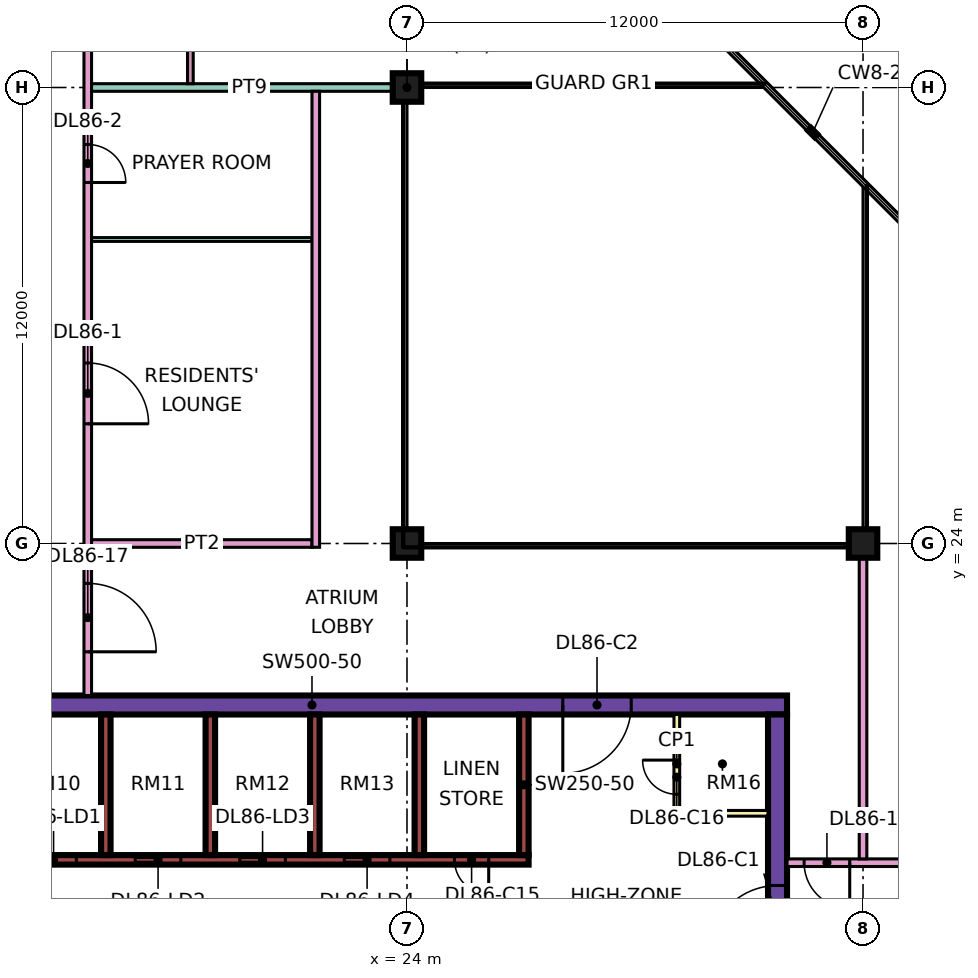
"""IFC4 building model, lengths in metres.
Left out: names, types, materials, properties, quantities, classifications, styles, units other than length and angle.
Written with IfcOpenShell. Run it as: python <this file> out.ifc"""

import sys

from ifc_helpers import new_model, si_unit, direction, frame, frame_2d, origin, origin_2d, place, context, subcontext, project, spatial, rectangle, extrude, element, fill, save


model = new_model("IFC4")
c1 = context("Model", 3, precision=1e-05, world=origin(), true_north=direction((0.0, 1.0)))
c2 = subcontext(c1, "Body", "Model", "MODEL_VIEW")
j1 = project(units=[si_unit("LENGTHUNIT", "METRE"), si_unit("PLANEANGLEUNIT", "RADIAN")], contexts=[c1])
p1 = place(None, origin())
s1 = spatial("IfcSite", under=j1, at=p1, CompositionType="ELEMENT")
p2 = place(p1, origin())
s2 = spatial("IfcBuilding", under=s1, at=p2, CompositionType="ELEMENT")
p3 = place(p2, frame((0.0, 0.0, 368.9)))
s3 = spatial("IfcBuildingStorey", under=s2, at=p3, CompositionType="ELEMENT", Elevation=368.9)
for number, where, z_axis, x_axis in (
    (1, (24.0, 24.0, 0.0), (0.0, 0.0, 1.0), (1.0, 0.0, 0.0)),
    (2, (24.0, 36.0, 0.0), (0.0, 0.0, 1.0), (1.0, 0.0, 0.0)),
    (3, (36.0, 24.0, 0.0), (0.0, 0.0, 1.0), (1.0, 0.0, 0.0)),
):
    element("IfcColumn", number, at=place(p3, frame(where, z_axis=z_axis, x_axis=x_axis)), inside=s3, PredefinedType="COLUMN", context=c2, shape_type="SweptSolid", body=[
        extrude(rectangle(XDim=0.75, YDim=0.75, at=origin_2d()), origin(), (0.0, 0.0, 1.0), 3.75),
    ])
p4 = place(p3, frame((9.0, 19.75, 0.0), z_axis=(0.0, 0.0, 1.0), x_axis=(1.0, 0.0, 0.0)))
e4 = element("IfcWall", 4, at=p4, inside=s3, PredefinedType="SHEAR", context=c2, shape_type="SweptSolid", body=[
    extrude(rectangle(XDim=25.0, YDim=0.5, at=frame_2d((12.5, 0.0))), origin(), (0.0, 0.0, 1.0), 3.75),
])
p5 = place(p4, frame((19.1, 0.0, 0.0)))
e5 = element("IfcOpeningElement", 5, at=p5, cuts=e4, PredefinedType="OPENING", context=c2, shape_type="SweptSolid", body=[
    extrude(rectangle(XDim=1.8, YDim=2.4, at=frame_2d((0.9, 1.2))), frame((0.0, 0.26, 0.0), z_axis=(0.0, -1.0, 0.0), x_axis=(1.0, 0.0, 0.0)), (0.0, 0.0, 1.0), 0.52),
])
p6 = place(p3, frame((33.75, 7.5, 0.0), z_axis=(0.0, 0.0, 1.0), x_axis=(0.0, 1.0, 0.0)))
e6 = element("IfcWall", 6, at=p6, inside=s3, PredefinedType="SHEAR", context=c2, shape_type="SweptSolid", body=[
    extrude(rectangle(XDim=12.0, YDim=0.5, at=frame_2d((6.0, 0.0))), origin(), (0.0, 0.0, 1.0), 3.75),
])
p7 = place(p6, frame((5.7, 0.0, 0.0)))
e7 = element("IfcOpeningElement", 7, at=p7, cuts=e6, PredefinedType="OPENING", context=c2, shape_type="SweptSolid", body=[
    extrude(rectangle(XDim=1.8, YDim=2.4, at=frame_2d((0.9, 1.2))), frame((0.0, 0.26, 0.0), z_axis=(0.0, -1.0, 0.0), x_axis=(1.0, 0.0, 0.0)), (0.0, 0.0, 1.0), 0.52),
])
p8 = place(p3, frame((13.45, 15.675, 0.0), z_axis=(0.0, 0.0, 1.0), x_axis=(1.0, 0.0, 0.0)))
e8 = element("IfcWall", 8, at=p8, inside=s3, PredefinedType="SHEAR", context=c2, shape_type="SweptSolid", body=[
    extrude(rectangle(XDim=13.75, YDim=0.25, at=frame_2d((6.875, 0.0))), origin(), (0.0, 0.0, 1.0), 3.75),
])
p9 = place(p8, frame((0.65, 0.0, 0.0)))
e9 = element("IfcOpeningElement", 9, at=p9, cuts=e8, PredefinedType="OPENING", context=c2, shape_type="SweptSolid", body=[
    extrude(rectangle(XDim=1.2, YDim=2.2, at=frame_2d((0.6, 1.1))), frame((0.0, 0.135, 0.0), z_axis=(0.0, -1.0, 0.0), x_axis=(1.0, 0.0, 0.0)), (0.0, 0.0, 1.0), 0.27),
])
p10 = place(p8, frame((3.4, 0.0, 0.0)))
e10 = element("IfcOpeningElement", 10, at=p10, cuts=e8, PredefinedType="OPENING", context=c2, shape_type="SweptSolid", body=[
    extrude(rectangle(XDim=1.2, YDim=2.2, at=frame_2d((0.6, 1.1))), frame((0.0, 0.135, 0.0), z_axis=(0.0, -1.0, 0.0), x_axis=(1.0, 0.0, 0.0)), (0.0, 0.0, 1.0), 0.27),
])
p11 = place(p8, frame((6.15, 0.0, 0.0)))
e11 = element("IfcOpeningElement", 11, at=p11, cuts=e8, PredefinedType="OPENING", context=c2, shape_type="SweptSolid", body=[
    extrude(rectangle(XDim=1.2, YDim=2.2, at=frame_2d((0.6, 1.1))), frame((0.0, 0.135, 0.0), z_axis=(0.0, -1.0, 0.0), x_axis=(1.0, 0.0, 0.0)), (0.0, 0.0, 1.0), 0.27),
])
p12 = place(p8, frame((8.9, 0.0, 0.0)))
e12 = element("IfcOpeningElement", 12, at=p12, cuts=e8, PredefinedType="OPENING", context=c2, shape_type="SweptSolid", body=[
    extrude(rectangle(XDim=1.2, YDim=2.2, at=frame_2d((0.6, 1.1))), frame((0.0, 0.135, 0.0), z_axis=(0.0, -1.0, 0.0), x_axis=(1.0, 0.0, 0.0)), (0.0, 0.0, 1.0), 0.27),
])
p13 = place(p8, frame((11.8, 0.0, 0.0)))
e13 = element("IfcOpeningElement", 13, at=p13, cuts=e8, PredefinedType="OPENING", context=c2, shape_type="SweptSolid", body=[
    extrude(rectangle(XDim=0.9, YDim=2.1, at=frame_2d((0.45, 1.05))), frame((0.0, 0.135, 0.0), z_axis=(0.0, -1.0, 0.0), x_axis=(1.0, 0.0, 0.0)), (0.0, 0.0, 1.0), 0.27),
])
for number, where, z_axis, x_axis in (
    (14, (16.075, 15.8, 0.0), (0.0, 0.0, 1.0), (0.0, 1.0, 0.0)),
    (15, (18.825, 15.8, 0.0), (0.0, 0.0, 1.0), (0.0, 1.0, 0.0)),
    (16, (21.575, 15.8, 0.0), (0.0, 0.0, 1.0), (0.0, 1.0, 0.0)),
    (17, (24.325, 15.8, 0.0), (0.0, 0.0, 1.0), (0.0, 1.0, 0.0)),
    (18, (27.075, 15.8, 0.0), (0.0, 0.0, 1.0), (0.0, 1.0, 0.0)),
):
    element("IfcWall", number, at=place(p3, frame(where, z_axis=z_axis, x_axis=x_axis)), inside=s3, PredefinedType="SHEAR", context=c2, shape_type="SweptSolid", body=[
        extrude(rectangle(XDim=3.7, YDim=0.25, at=frame_2d((1.85, 0.0))), origin(), (0.0, 0.0, 1.0), 3.75),
    ])
p14 = place(p3, frame((31.1, 16.9, 0.0), z_axis=(0.0, 0.0, 1.0), x_axis=(0.0, 1.0, 0.0)))
e19 = element("IfcWall", 19, at=p14, inside=s3, PredefinedType="PARTITIONING", context=c2, shape_type="SweptSolid", body=[
    extrude(rectangle(XDim=2.6, YDim=0.15, at=frame_2d((1.3, 0.0))), origin(), (0.0, 0.0, 1.0), 3.35),
])
p15 = place(p14, frame((0.5, 0.0, 0.0)))
e20 = element("IfcOpeningElement", 20, at=p15, cuts=e19, PredefinedType="OPENING", context=c2, shape_type="SweptSolid", body=[
    extrude(rectangle(XDim=0.9, YDim=2.1, at=frame_2d((0.45, 1.05))), frame((0.0, 0.085, 0.0), z_axis=(0.0, -1.0, 0.0), x_axis=(1.0, 0.0, 0.0)), (0.0, 0.0, 1.0), 0.17),
])
p16 = place(p3, frame((31.1, 16.9, 0.0), z_axis=(0.0, 0.0, 1.0), x_axis=(1.0, 0.0, 0.0)))
e21 = element("IfcWall", 21, at=p16, inside=s3, PredefinedType="PARTITIONING", context=c2, shape_type="SweptSolid", body=[
    extrude(rectangle(XDim=2.4, YDim=0.15, at=frame_2d((1.2, 0.0))), origin(), (0.0, 0.0, 1.0), 3.35),
])
p17 = place(p3, frame((15.6, 20.0, 0.0), z_axis=(0.0, 0.0, 1.0), x_axis=(0.0, 1.0, 0.0)))
e22 = element("IfcWall", 22, at=p17, inside=s3, PredefinedType="PARTITIONING", context=c2, shape_type="SweptSolid", body=[
    extrude(rectangle(XDim=27.775, YDim=0.2, at=frame_2d((13.887, 0.0))), origin(), (0.0, 0.0, 1.0), 3.35),
])
p18 = place(p17, frame((7.15, 0.0, 0.0)))
e23 = element("IfcOpeningElement", 23, at=p18, cuts=e22, PredefinedType="OPENING", context=c2, shape_type="SweptSolid", body=[
    extrude(rectangle(XDim=1.6, YDim=2.1, at=frame_2d((0.8, 1.05))), frame((0.0, 0.11, 0.0), z_axis=(0.0, -1.0, 0.0), x_axis=(1.0, 0.0, 0.0)), (0.0, 0.0, 1.0), 0.22),
])
p19 = place(p17, frame((13.5, 0.0, 0.0)))
e24 = element("IfcOpeningElement", 24, at=p19, cuts=e22, PredefinedType="OPENING", context=c2, shape_type="SweptSolid", body=[
    extrude(rectangle(XDim=1.0, YDim=2.1, at=frame_2d((0.5, 1.05))), frame((0.0, 0.11, 0.0), z_axis=(0.0, -1.0, 0.0), x_axis=(1.0, 0.0, 0.0)), (0.0, 0.0, 1.0), 0.22),
])
p20 = place(p17, frame((23.35, 0.0, 0.0)))
e25 = element("IfcOpeningElement", 25, at=p20, cuts=e22, PredefinedType="OPENING", context=c2, shape_type="SweptSolid", body=[
    extrude(rectangle(XDim=1.0, YDim=2.1, at=frame_2d((0.5, 1.05))), frame((0.0, 0.11, 0.0), z_axis=(0.0, -1.0, 0.0), x_axis=(1.0, 0.0, 0.0)), (0.0, 0.0, 1.0), 0.22),
])
p21 = place(p17, frame((1.15, 0.0, 0.0)))
e26 = element("IfcOpeningElement", 26, at=p21, cuts=e22, PredefinedType="OPENING", context=c2, shape_type="SweptSolid", body=[
    extrude(rectangle(XDim=1.8, YDim=2.1, at=frame_2d((0.9, 1.05))), frame((0.0, 0.11, 0.0), z_axis=(0.0, -1.0, 0.0), x_axis=(1.0, 0.0, 0.0)), (0.0, 0.0, 1.0), 0.22),
])
p22 = place(p17, frame((25.9, 0.0, 0.0)))
e27 = element("IfcOpeningElement", 27, at=p22, cuts=e22, PredefinedType="OPENING", context=c2, shape_type="SweptSolid", body=[
    extrude(rectangle(XDim=1.0, YDim=2.1, at=frame_2d((0.5, 1.05))), frame((0.0, 0.11, 0.0), z_axis=(0.0, -1.0, 0.0), x_axis=(1.0, 0.0, 0.0)), (0.0, 0.0, 1.0), 0.22),
])
p23 = place(p3, frame((15.7, 24.0, 0.0), z_axis=(0.0, 0.0, 1.0), x_axis=(1.0, 0.0, 0.0)))
e28 = element("IfcWall", 28, at=p23, inside=s3, PredefinedType="PARTITIONING", context=c2, shape_type="SweptSolid", body=[
    extrude(rectangle(XDim=5.8, YDim=0.2, at=frame_2d((2.9, 0.0))), origin(), (0.0, 0.0, 1.0), 3.35),
])
p24 = place(p3, frame((15.7, 32.0, 0.0), z_axis=(0.0, 0.0, 1.0), x_axis=(1.0, 0.0, 0.0)))
e29 = element("IfcWall", 29, at=p24, inside=s3, PredefinedType="PARTITIONING", context=c2, shape_type="SweptSolid", body=[
    extrude(rectangle(XDim=5.8, YDim=0.1, at=frame_2d((2.9, 0.0))), origin(), (0.0, 0.0, 1.0), 3.35),
])
p25 = place(p3, frame((15.7, 36.0, 0.0), z_axis=(0.0, 0.0, 1.0), x_axis=(1.0, 0.0, 0.0)))
e30 = element("IfcWall", 30, at=p25, inside=s3, PredefinedType="PARTITIONING", context=c2, shape_type="SweptSolid", body=[
    extrude(rectangle(XDim=8.3, YDim=0.2, at=frame_2d((4.15, 0.0))), origin(), (0.0, 0.0, 1.0), 3.35),
])
p26 = place(p3, frame((18.3, 36.1, 0.0), z_axis=(0.0, 0.0, 1.0), x_axis=(0.0, 1.0, 0.0)))
e31 = element("IfcWall", 31, at=p26, inside=s3, PredefinedType="PARTITIONING", context=c2, shape_type="SweptSolid", body=[
    extrude(rectangle(XDim=6.575, YDim=0.15, at=frame_2d((3.288, 0.0))), origin(), (0.0, 0.0, 1.0), 3.35),
])
p27 = place(p26, frame((1.1, 0.0, 0.0)))
e32 = element("IfcOpeningElement", 32, at=p27, cuts=e31, PredefinedType="OPENING", context=c2, shape_type="SweptSolid", body=[
    extrude(rectangle(XDim=0.9, YDim=2.1, at=frame_2d((0.45, 1.05))), frame((0.0, 0.085, 0.0), z_axis=(0.0, -1.0, 0.0), x_axis=(1.0, 0.0, 0.0)), (0.0, 0.0, 1.0), 0.17),
])
p28 = place(p3, frame((21.6, 23.9, 0.0), z_axis=(0.0, 0.0, 1.0), x_axis=(0.0, 1.0, 0.0)))
e33 = element("IfcWall", 33, at=p28, inside=s3, PredefinedType="PARTITIONING", context=c2, shape_type="SweptSolid", body=[
    extrude(rectangle(XDim=12.0, YDim=0.2, at=frame_2d((6.0, 0.0))), origin(), (0.0, 0.0, 1.0), 3.35),
])
p29 = place(p3, frame((34.0, 15.6, 0.0), z_axis=(0.0, 0.0, 1.0), x_axis=(1.0, 0.0, 0.0)))
e34 = element("IfcWall", 34, at=p29, inside=s3, PredefinedType="PARTITIONING", context=c2, shape_type="SweptSolid", body=[
    extrude(rectangle(XDim=10.35, YDim=0.2, at=frame_2d((5.175, 0.0))), origin(), (0.0, 0.0, 1.0), 3.35),
])
p30 = place(p29, frame((5.6, 0.0, 0.0)))
e35 = element("IfcOpeningElement", 35, at=p30, cuts=e34, PredefinedType="OPENING", context=c2, shape_type="SweptSolid", body=[
    extrude(rectangle(XDim=1.0, YDim=2.1, at=frame_2d((0.5, 1.05))), frame((0.0, 0.11, 0.0), z_axis=(0.0, -1.0, 0.0), x_axis=(1.0, 0.0, 0.0)), (0.0, 0.0, 1.0), 0.22),
])
p31 = place(p29, frame((0.45, 0.0, 0.0)))
e36 = element("IfcOpeningElement", 36, at=p31, cuts=e34, PredefinedType="OPENING", context=c2, shape_type="SweptSolid", body=[
    extrude(rectangle(XDim=1.2, YDim=2.1, at=frame_2d((0.6, 1.05))), frame((0.0, 0.11, 0.0), z_axis=(0.0, -1.0, 0.0), x_axis=(1.0, 0.0, 0.0)), (0.0, 0.0, 1.0), 0.22),
])
p32 = place(p3, frame((36.0, 15.7, 0.0), z_axis=(0.0, 0.0, 1.0), x_axis=(0.0, 1.0, 0.0)))
e37 = element("IfcWall", 37, at=p32, inside=s3, PredefinedType="PARTITIONING", context=c2, shape_type="SweptSolid", body=[
    extrude(rectangle(XDim=8.3, YDim=0.2, at=frame_2d((4.15, 0.0))), origin(), (0.0, 0.0, 1.0), 3.35),
])
p33 = place(p9, origin())
e38 = element("IfcDoor", 38, at=p33, inside=s3, OperationType="DOUBLE_DOOR_SLIDING", PredefinedType="DOOR", context=c2, shape_type="SweptSolid", body=[
    extrude(rectangle(XDim=1.2, YDim=2.2, at=frame_2d((0.6, 1.1))), frame((0.0, 0.025, 0.0), z_axis=(0.0, -1.0, 0.0), x_axis=(1.0, 0.0, 0.0)), (0.0, 0.0, 1.0), 0.05),
])
fill(e9, e38)
p34 = place(p10, origin())
e39 = element("IfcDoor", 39, at=p34, inside=s3, OperationType="DOUBLE_DOOR_SLIDING", PredefinedType="DOOR", context=c2, shape_type="SweptSolid", body=[
    extrude(rectangle(XDim=1.2, YDim=2.2, at=frame_2d((0.6, 1.1))), frame((0.0, 0.025, 0.0), z_axis=(0.0, -1.0, 0.0), x_axis=(1.0, 0.0, 0.0)), (0.0, 0.0, 1.0), 0.05),
])
fill(e10, e39)
p35 = place(p11, origin())
e40 = element("IfcDoor", 40, at=p35, inside=s3, OperationType="DOUBLE_DOOR_SLIDING", PredefinedType="DOOR", context=c2, shape_type="SweptSolid", body=[
    extrude(rectangle(XDim=1.2, YDim=2.2, at=frame_2d((0.6, 1.1))), frame((0.0, 0.025, 0.0), z_axis=(0.0, -1.0, 0.0), x_axis=(1.0, 0.0, 0.0)), (0.0, 0.0, 1.0), 0.05),
])
fill(e11, e40)
p36 = place(p12, origin())
e41 = element("IfcDoor", 41, at=p36, inside=s3, OperationType="DOUBLE_DOOR_SLIDING", PredefinedType="DOOR", context=c2, shape_type="SweptSolid", body=[
    extrude(rectangle(XDim=1.2, YDim=2.2, at=frame_2d((0.6, 1.1))), frame((0.0, 0.025, 0.0), z_axis=(0.0, -1.0, 0.0), x_axis=(1.0, 0.0, 0.0)), (0.0, 0.0, 1.0), 0.05),
])
fill(e12, e41)
p37 = place(p7, origin())
e42 = element("IfcDoor", 42, at=p37, inside=s3, OperationType="DOUBLE_DOOR_SINGLE_SWING", PredefinedType="DOOR", context=c2, shape_type="SweptSolid", body=[
    extrude(rectangle(XDim=1.8, YDim=2.4, at=frame_2d((0.9, 1.2))), frame((0.0, 0.025, 0.0), z_axis=(0.0, -1.0, 0.0), x_axis=(1.0, 0.0, 0.0)), (0.0, 0.0, 1.0), 0.05),
])
fill(e7, e42)
p38 = place(p5, frame((1.8, 0.0, 0.0), z_axis=(0.0, 0.0, 1.0), x_axis=(-1.0, 0.0, 0.0)))
e43 = element("IfcDoor", 43, at=p38, inside=s3, OperationType="DOUBLE_DOOR_SINGLE_SWING", PredefinedType="DOOR", context=c2, shape_type="SweptSolid", body=[
    extrude(rectangle(XDim=1.8, YDim=2.4, at=frame_2d((0.9, 1.2))), frame((0.0, 0.025, 0.0), z_axis=(0.0, -1.0, 0.0), x_axis=(1.0, 0.0, 0.0)), (0.0, 0.0, 1.0), 0.05),
])
fill(e5, e43)
p39 = place(p13, origin())
e44 = element("IfcDoor", 44, at=p39, inside=s3, OperationType="SINGLE_SWING_RIGHT", PredefinedType="DOOR", context=c2, shape_type="SweptSolid", body=[
    extrude(rectangle(XDim=0.9, YDim=2.1, at=frame_2d((0.45, 1.05))), frame((0.0, 0.025, 0.0), z_axis=(0.0, -1.0, 0.0), x_axis=(1.0, 0.0, 0.0)), (0.0, 0.0, 1.0), 0.05),
])
fill(e13, e44)
p40 = place(p15, frame((0.9, 0.0, 0.0), z_axis=(0.0, 0.0, 1.0), x_axis=(-1.0, 0.0, 0.0)))
e45 = element("IfcDoor", 45, at=p40, inside=s3, OperationType="SINGLE_SWING_RIGHT", PredefinedType="DOOR", context=c2, shape_type="SweptSolid", body=[
    extrude(rectangle(XDim=0.9, YDim=2.1, at=frame_2d((0.45, 1.05))), frame((0.0, 0.025, 0.0), z_axis=(0.0, -1.0, 0.0), x_axis=(1.0, 0.0, 0.0)), (0.0, 0.0, 1.0), 0.05),
])
fill(e20, e45)
p41 = place(p18, frame((1.6, 0.0, 0.0), z_axis=(0.0, 0.0, 1.0), x_axis=(-1.0, 0.0, 0.0)))
e46 = element("IfcDoor", 46, at=p41, inside=s3, OperationType="DOUBLE_DOOR_SINGLE_SWING", PredefinedType="DOOR", context=c2, shape_type="SweptSolid", body=[
    extrude(rectangle(XDim=1.6, YDim=2.1, at=frame_2d((0.8, 1.05))), frame((0.0, 0.025, 0.0), z_axis=(0.0, -1.0, 0.0), x_axis=(1.0, 0.0, 0.0)), (0.0, 0.0, 1.0), 0.05),
])
fill(e23, e46)
p42 = place(p19, frame((1.0, 0.0, 0.0), z_axis=(0.0, 0.0, 1.0), x_axis=(-1.0, 0.0, 0.0)))
e47 = element("IfcDoor", 47, at=p42, inside=s3, OperationType="SINGLE_SWING_LEFT", PredefinedType="DOOR", context=c2, shape_type="SweptSolid", body=[
    extrude(rectangle(XDim=1.0, YDim=2.1, at=frame_2d((0.5, 1.05))), frame((0.0, 0.025, 0.0), z_axis=(0.0, -1.0, 0.0), x_axis=(1.0, 0.0, 0.0)), (0.0, 0.0, 1.0), 0.05),
])
fill(e24, e47)
p43 = place(p31, origin())
e48 = element("IfcDoor", 48, at=p43, inside=s3, OperationType="SINGLE_SWING_RIGHT", PredefinedType="DOOR", context=c2, shape_type="SweptSolid", body=[
    extrude(rectangle(XDim=1.2, YDim=2.1, at=frame_2d((0.6, 1.05))), frame((0.0, 0.025, 0.0), z_axis=(0.0, -1.0, 0.0), x_axis=(1.0, 0.0, 0.0)), (0.0, 0.0, 1.0), 0.05),
])
fill(e36, e48)
p44 = place(p21, frame((1.8, 0.0, 0.0), z_axis=(0.0, 0.0, 1.0), x_axis=(-1.0, 0.0, 0.0)))
e49 = element("IfcDoor", 49, at=p44, inside=s3, OperationType="DOUBLE_DOOR_SINGLE_SWING", PredefinedType="DOOR", context=c2, shape_type="SweptSolid", body=[
    extrude(rectangle(XDim=1.8, YDim=2.1, at=frame_2d((0.9, 1.05))), frame((0.0, 0.025, 0.0), z_axis=(0.0, -1.0, 0.0), x_axis=(1.0, 0.0, 0.0)), (0.0, 0.0, 1.0), 0.05),
])
fill(e26, e49)
save(model, sys.argv[1])
